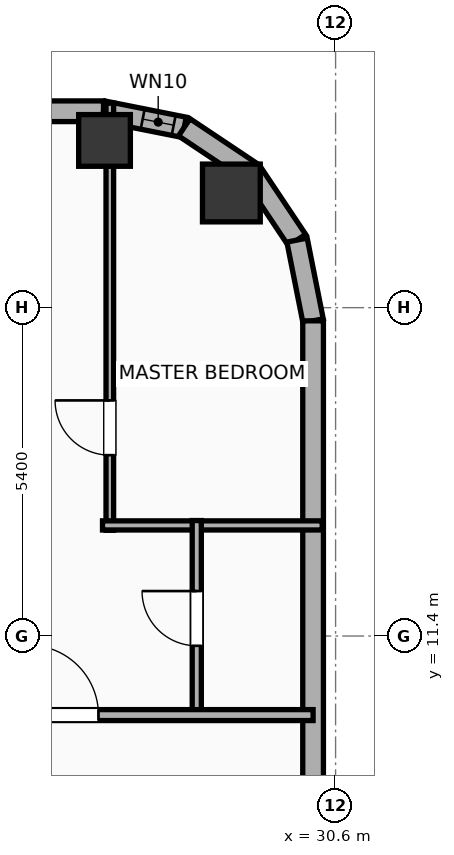
"""IFC4 building model, lengths in metres.
Left out: names, types, materials, properties, quantities, classifications, styles, units other than length and angle.
Written with IfcOpenShell. Run it as: python <this file> out.ifc"""

import sys

from ifc_helpers import new_model, si_unit, direction, frame, frame_2d, origin, origin_2d, place, context, subcontext, project, spatial, rectangle, hollow_rectangle, hollow_circle, extrude, element, fill, save


model = new_model("IFC4")
c1 = context("Model", 3, precision=1e-05, world=origin(), true_north=direction((0.0, 1.0)))
c2 = subcontext(c1, "Body", "Model", "MODEL_VIEW")
j1 = project(units=[si_unit("LENGTHUNIT", "METRE"), si_unit("PLANEANGLEUNIT", "RADIAN")], contexts=[c1])
p1 = place(None, origin())
s1 = spatial("IfcSite", under=j1, at=p1, CompositionType="ELEMENT")
p2 = place(p1, origin())
s2 = spatial("IfcBuilding", under=s1, at=p2, CompositionType="ELEMENT")
p3 = place(p2, frame((0.0, 0.0, 235.3)))
s3 = spatial("IfcBuildingStorey", under=s2, at=p3, CompositionType="ELEMENT", Elevation=235.3)
p4 = place(p3, frame((28.886, 18.686, 0.0), z_axis=(0.0, 0.0, 1.0), x_axis=(1.0, 0.0, 0.0)))
e1 = element("IfcColumn", 1, at=p4, inside=s3, PredefinedType="COLUMN", context=c2, shape_type="SweptSolid", body=[
    extrude(hollow_circle(Radius=0.475, WallThickness=0.032, at=origin_2d()), origin(), (0.0, 0.0, 1.0), 3.9),
])
p5 = place(p3, frame((26.8, 19.55, 0.0), z_axis=(0.0, 0.0, 1.0), x_axis=(1.0, 0.0, 0.0)))
e2 = element("IfcColumn", 2, at=p5, inside=s3, PredefinedType="COLUMN", context=c2, shape_type="SweptSolid", body=[
    extrude(hollow_rectangle(XDim=0.85, YDim=0.85, WallThickness=0.028, at=origin_2d()), origin(), (0.0, 0.0, 1.0), 3.9),
])
p6 = place(p3, frame((-22.783, 20.03, 0.0), z_axis=(0.0, 0.0, 1.0), x_axis=(1.0, 0.0, 0.0)))
e3 = element("IfcWall", 3, at=p6, inside=s3, PredefinedType="ELEMENTEDWALL", context=c2, shape_type="SweptSolid", body=[
    extrude(rectangle(XDim=49.566, YDim=0.34, at=frame_2d((24.783, 0.0))), origin(), (0.0, 0.0, 1.0), 3.65),
])
p7 = place(p6, frame((23.583, 0.0, 0.75)))
e4 = element("IfcOpeningElement", 4, at=p7, cuts=e3, PredefinedType="OPENING", context=c2, shape_type="SweptSolid", body=[
    extrude(rectangle(XDim=2.4, YDim=2.1, at=frame_2d((1.2, 1.05))), frame((0.0, 0.18, 0.0), z_axis=(0.0, -1.0, 0.0), x_axis=(1.0, 0.0, 0.0)), (0.0, 0.0, 1.0), 0.36),
])
p8 = place(p6, frame((40.956, 0.0, 0.75)))
e5 = element("IfcOpeningElement", 5, at=p8, cuts=e3, PredefinedType="OPENING", context=c2, shape_type="SweptSolid", body=[
    extrude(rectangle(XDim=2.4, YDim=2.1, at=frame_2d((1.2, 1.05))), frame((0.0, 0.18, 0.0), z_axis=(0.0, -1.0, 0.0), x_axis=(1.0, 0.0, 0.0)), (0.0, 0.0, 1.0), 0.36),
])
p9 = place(p6, frame((5.078, 0.0, 0.75)))
e6 = element("IfcOpeningElement", 6, at=p9, cuts=e3, PredefinedType="OPENING", context=c2, shape_type="SweptSolid", body=[
    extrude(rectangle(XDim=1.2, YDim=2.05, at=frame_2d((0.6, 1.025))), frame((0.0, 0.18, 0.0), z_axis=(0.0, -1.0, 0.0), x_axis=(1.0, 0.0, 0.0)), (0.0, 0.0, 1.0), 0.36),
])
p10 = place(p6, frame((8.058, 0.0, 0.75)))
e7 = element("IfcOpeningElement", 7, at=p10, cuts=e3, PredefinedType="OPENING", context=c2, shape_type="SweptSolid", body=[
    extrude(rectangle(XDim=1.2, YDim=2.05, at=frame_2d((0.6, 1.025))), frame((0.0, 0.18, 0.0), z_axis=(0.0, -1.0, 0.0), x_axis=(1.0, 0.0, 0.0)), (0.0, 0.0, 1.0), 0.36),
])
p11 = place(p6, frame((12.478, 0.0, 0.75)))
e8 = element("IfcOpeningElement", 8, at=p11, cuts=e3, PredefinedType="OPENING", context=c2, shape_type="SweptSolid", body=[
    extrude(rectangle(XDim=1.2, YDim=2.05, at=frame_2d((0.6, 1.025))), frame((0.0, 0.18, 0.0), z_axis=(0.0, -1.0, 0.0), x_axis=(1.0, 0.0, 0.0)), (0.0, 0.0, 1.0), 0.36),
])
p12 = place(p6, frame((16.178, 0.0, 0.75)))
e9 = element("IfcOpeningElement", 9, at=p12, cuts=e3, PredefinedType="OPENING", context=c2, shape_type="SweptSolid", body=[
    extrude(rectangle(XDim=1.2, YDim=2.05, at=frame_2d((0.6, 1.025))), frame((0.0, 0.18, 0.0), z_axis=(0.0, -1.0, 0.0), x_axis=(1.0, 0.0, 0.0)), (0.0, 0.0, 1.0), 0.36),
])
p13 = place(p6, frame((20.478, 0.0, 0.75)))
e10 = element("IfcOpeningElement", 10, at=p13, cuts=e3, PredefinedType="OPENING", context=c2, shape_type="SweptSolid", body=[
    extrude(rectangle(XDim=1.2, YDim=2.05, at=frame_2d((0.6, 1.025))), frame((0.0, 0.18, 0.0), z_axis=(0.0, -1.0, 0.0), x_axis=(1.0, 0.0, 0.0)), (0.0, 0.0, 1.0), 0.36),
])
p14 = place(p6, frame((27.278, 0.0, 0.75)))
e11 = element("IfcOpeningElement", 11, at=p14, cuts=e3, PredefinedType="OPENING", context=c2, shape_type="SweptSolid", body=[
    extrude(rectangle(XDim=1.2, YDim=2.05, at=frame_2d((0.6, 1.025))), frame((0.0, 0.18, 0.0), z_axis=(0.0, -1.0, 0.0), x_axis=(1.0, 0.0, 0.0)), (0.0, 0.0, 1.0), 0.36),
])
p15 = place(p6, frame((30.978, 0.0, 0.75)))
e12 = element("IfcOpeningElement", 12, at=p15, cuts=e3, PredefinedType="OPENING", context=c2, shape_type="SweptSolid", body=[
    extrude(rectangle(XDim=1.2, YDim=2.05, at=frame_2d((0.6, 1.025))), frame((0.0, 0.18, 0.0), z_axis=(0.0, -1.0, 0.0), x_axis=(1.0, 0.0, 0.0)), (0.0, 0.0, 1.0), 0.36),
])
p16 = place(p6, frame((34.678, 0.0, 0.75)))
e13 = element("IfcOpeningElement", 13, at=p16, cuts=e3, PredefinedType="OPENING", context=c2, shape_type="SweptSolid", body=[
    extrude(rectangle(XDim=1.2, YDim=2.05, at=frame_2d((0.6, 1.025))), frame((0.0, 0.18, 0.0), z_axis=(0.0, -1.0, 0.0), x_axis=(1.0, 0.0, 0.0)), (0.0, 0.0, 1.0), 0.36),
])
p17 = place(p6, frame((37.798, 0.0, 0.75)))
e14 = element("IfcOpeningElement", 14, at=p17, cuts=e3, PredefinedType="OPENING", context=c2, shape_type="SweptSolid", body=[
    extrude(rectangle(XDim=1.2, YDim=2.05, at=frame_2d((0.6, 1.025))), frame((0.0, 0.18, 0.0), z_axis=(0.0, -1.0, 0.0), x_axis=(1.0, 0.0, 0.0)), (0.0, 0.0, 1.0), 0.36),
])
p18 = place(p6, frame((45.83, 0.0, 0.75)))
e15 = element("IfcOpeningElement", 15, at=p18, cuts=e3, PredefinedType="OPENING", context=c2, shape_type="SweptSolid", body=[
    extrude(rectangle(XDim=1.2, YDim=2.05, at=frame_2d((0.6, 1.025))), frame((0.0, 0.18, 0.0), z_axis=(0.0, -1.0, 0.0), x_axis=(1.0, 0.0, 0.0)), (0.0, 0.0, 1.0), 0.36),
])
p19 = place(p3, frame((26.783, 20.03, 0.0), z_axis=(0.0, 0.0, 1.0), x_axis=(0.980788153188, -0.195075878998, 0.0)))
e16 = element("IfcWall", 16, at=p19, inside=s3, PredefinedType="ELEMENTEDWALL", context=c2, shape_type="SweptSolid", body=[
    extrude(rectangle(XDim=1.354, YDim=0.34, at=frame_2d((0.677, 0.0))), origin(), (0.0, 0.0, 1.0), 3.65),
])
p20 = place(p19, frame((0.657, 0.0, 0.75)))
e17 = element("IfcOpeningElement", 17, at=p20, cuts=e16, PredefinedType="OPENING", context=c2, shape_type="SweptSolid", body=[
    extrude(rectangle(XDim=0.52, YDim=2.05, at=frame_2d((0.26, 1.025))), frame((0.0, 0.18, 0.0), z_axis=(0.0, -1.0, 0.0), x_axis=(1.0, 0.0, 0.0)), (0.0, 0.0, 1.0), 0.36),
])
for number, where, z_axis, x_axis in (
    (18, (28.111, 19.766, 0.0), (0.0, 0.0, 1.0), (0.831, -0.556, 0.0)),
    (19, (29.223, 19.023, 0.0), (0.0, 0.0, 1.0), (0.556, -0.831, 0.0)),
):
    element("IfcWall", number, at=place(p3, frame(where, z_axis=z_axis, x_axis=x_axis)), inside=s3, PredefinedType="ELEMENTEDWALL", context=c2, shape_type="SweptSolid", body=[
        extrude(rectangle(XDim=1.337, YDim=0.34, at=frame_2d((0.668, 0.0))), origin(), (0.0, 0.0, 1.0), 3.65),
    ])
p21 = place(p3, frame((29.966, 17.911, 0.0), z_axis=(0.0, 0.0, 1.0), x_axis=(0.195075878998, -0.980788153188, 0.0)))
e20 = element("IfcWall", 20, at=p21, inside=s3, PredefinedType="ELEMENTEDWALL", context=c2, shape_type="SweptSolid", body=[
    extrude(rectangle(XDim=1.354, YDim=0.34, at=frame_2d((0.677, 0.0))), origin(), (0.0, 0.0, 1.0), 3.65),
])
p22 = place(p3, frame((30.23, 16.583, 0.0), z_axis=(0.0, 0.0, 1.0), x_axis=(0.0, -1.0, 0.0)))
e21 = element("IfcWall", 21, at=p22, inside=s3, PredefinedType="ELEMENTEDWALL", context=c2, shape_type="SweptSolid", body=[
    extrude(rectangle(XDim=31.967, YDim=0.34, at=frame_2d((15.983, 0.0))), origin(), (0.0, 0.0, 1.0), 3.65),
])
p23 = place(p22, frame((11.638, 0.0, 0.75)))
e22 = element("IfcOpeningElement", 22, at=p23, cuts=e21, PredefinedType="OPENING", context=c2, shape_type="SweptSolid", body=[
    extrude(rectangle(XDim=1.2, YDim=2.05, at=frame_2d((0.6, 1.025))), frame((0.0, 0.18, 0.0), z_axis=(0.0, -1.0, 0.0), x_axis=(1.0, 0.0, 0.0)), (0.0, 0.0, 1.0), 0.36),
])
p24 = place(p22, frame((20.188, 0.0, 0.75)))
e23 = element("IfcOpeningElement", 23, at=p24, cuts=e21, PredefinedType="OPENING", context=c2, shape_type="SweptSolid", body=[
    extrude(rectangle(XDim=1.2, YDim=2.05, at=frame_2d((0.6, 1.025))), frame((0.0, 0.18, 0.0), z_axis=(0.0, -1.0, 0.0), x_axis=(1.0, 0.0, 0.0)), (0.0, 0.0, 1.0), 0.36),
])
p25 = place(p3, frame((26.887, 13.139, 0.0), z_axis=(0.0, 0.0, 1.0), x_axis=(0.0, 1.0, 0.0)))
e24 = element("IfcWall", 24, at=p25, inside=s3, PredefinedType="PARTITIONING", context=c2, shape_type="SweptSolid", body=[
    extrude(rectangle(XDim=7.023, YDim=0.125, at=frame_2d((3.512, 0.0))), origin(), (0.0, 0.0, 1.0), 3.65),
])
p26 = place(p25, frame((1.236, 0.0, 0.0)))
e25 = element("IfcOpeningElement", 25, at=p26, cuts=e24, PredefinedType="OPENING", context=c2, shape_type="SweptSolid", body=[
    extrude(rectangle(XDim=0.9, YDim=2.05, at=frame_2d((0.45, 1.025))), frame((0.0, 0.073, 0.0), z_axis=(0.0, -1.0, 0.0), x_axis=(1.0, 0.0, 0.0)), (0.0, 0.0, 1.0), 0.145),
])
p27 = place(p3, frame((26.767, 13.219, 0.0), z_axis=(0.0, 0.0, 1.0), x_axis=(1.0, 0.0, 0.0)))
e26 = element("IfcWall", 26, at=p27, inside=s3, PredefinedType="PLUMBINGWALL", context=c2, shape_type="SweptSolid", body=[
    extrude(rectangle(XDim=3.613, YDim=0.15, at=frame_2d((1.806, 0.0))), origin(), (0.0, 0.0, 1.0), 3.65),
])
p28 = place(p3, frame((28.317, 10.08, 0.0), z_axis=(0.0, 0.0, 1.0), x_axis=(0.0, 1.0, 0.0)))
e27 = element("IfcWall", 27, at=p28, inside=s3, PredefinedType="PLUMBINGWALL", context=c2, shape_type="SweptSolid", body=[
    extrude(rectangle(XDim=3.219, YDim=0.15, at=frame_2d((1.609, 0.0))), origin(), (0.0, 0.0, 1.0), 3.65),
])
p29 = place(p28, frame((1.159, 0.0, 0.0)))
e28 = element("IfcOpeningElement", 28, at=p29, cuts=e27, PredefinedType="OPENING", context=c2, shape_type="SweptSolid", body=[
    extrude(rectangle(XDim=0.9, YDim=2.05, at=frame_2d((0.45, 1.025))), frame((0.0, 0.085, 0.0), z_axis=(0.0, -1.0, 0.0), x_axis=(1.0, 0.0, 0.0)), (0.0, 0.0, 1.0), 0.17),
])
p30 = place(p3, frame((-26.23, 10.1, 0.0), z_axis=(0.0, 0.0, 1.0), x_axis=(1.0, 0.0, 0.0)))
e29 = element("IfcWall", 29, at=p30, inside=s3, PredefinedType="PARTITIONING", context=c2, shape_type="SweptSolid", body=[
    extrude(rectangle(XDim=56.46, YDim=0.18, at=frame_2d((28.23, 0.0))), origin(), (0.0, 0.0, 1.0), 3.65),
])
p31 = place(p30, frame((5.302, 0.0, 0.0)))
e30 = element("IfcOpeningElement", 30, at=p31, cuts=e29, PredefinedType="OPENING", context=c2, shape_type="SweptSolid", body=[
    extrude(rectangle(XDim=1.15, YDim=2.05, at=frame_2d((0.575, 1.025))), frame((0.0, 0.1, 0.0), z_axis=(0.0, -1.0, 0.0), x_axis=(1.0, 0.0, 0.0)), (0.0, 0.0, 1.0), 0.2),
])
p32 = place(p30, frame((14.122, 0.0, 0.0)))
e31 = element("IfcOpeningElement", 31, at=p32, cuts=e29, PredefinedType="OPENING", context=c2, shape_type="SweptSolid", body=[
    extrude(rectangle(XDim=1.15, YDim=2.05, at=frame_2d((0.575, 1.025))), frame((0.0, 0.1, 0.0), z_axis=(0.0, -1.0, 0.0), x_axis=(1.0, 0.0, 0.0)), (0.0, 0.0, 1.0), 0.2),
])
p33 = place(p30, frame((21.518, 0.0, 0.0)))
e32 = element("IfcOpeningElement", 32, at=p33, cuts=e29, PredefinedType="OPENING", context=c2, shape_type="SweptSolid", body=[
    extrude(rectangle(XDim=1.15, YDim=2.05, at=frame_2d((0.575, 1.025))), frame((0.0, 0.1, 0.0), z_axis=(0.0, -1.0, 0.0), x_axis=(1.0, 0.0, 0.0)), (0.0, 0.0, 1.0), 0.2),
])
p34 = place(p30, frame((28.92, 0.0, 0.0)))
e33 = element("IfcOpeningElement", 33, at=p34, cuts=e29, PredefinedType="OPENING", context=c2, shape_type="SweptSolid", body=[
    extrude(rectangle(XDim=1.15, YDim=2.05, at=frame_2d((0.575, 1.025))), frame((0.0, 0.1, 0.0), z_axis=(0.0, -1.0, 0.0), x_axis=(1.0, 0.0, 0.0)), (0.0, 0.0, 1.0), 0.2),
])
p35 = place(p30, frame((36.322, 0.0, 0.0)))
e34 = element("IfcOpeningElement", 34, at=p35, cuts=e29, PredefinedType="OPENING", context=c2, shape_type="SweptSolid", body=[
    extrude(rectangle(XDim=1.15, YDim=2.05, at=frame_2d((0.575, 1.025))), frame((0.0, 0.1, 0.0), z_axis=(0.0, -1.0, 0.0), x_axis=(1.0, 0.0, 0.0)), (0.0, 0.0, 1.0), 0.2),
])
p36 = place(p30, frame((43.622, 0.0, 0.0)))
e35 = element("IfcOpeningElement", 35, at=p36, cuts=e29, PredefinedType="OPENING", context=c2, shape_type="SweptSolid", body=[
    extrude(rectangle(XDim=1.15, YDim=2.05, at=frame_2d((0.575, 1.025))), frame((0.0, 0.1, 0.0), z_axis=(0.0, -1.0, 0.0), x_axis=(1.0, 0.0, 0.0)), (0.0, 0.0, 1.0), 0.2),
])
p37 = place(p30, frame((51.781, 0.0, 0.0)))
e36 = element("IfcOpeningElement", 36, at=p37, cuts=e29, PredefinedType="OPENING", context=c2, shape_type="SweptSolid", body=[
    extrude(rectangle(XDim=1.15, YDim=2.05, at=frame_2d((0.575, 1.025))), frame((0.0, 0.1, 0.0), z_axis=(0.0, -1.0, 0.0), x_axis=(1.0, 0.0, 0.0)), (0.0, 0.0, 1.0), 0.2),
])
p38 = place(p20, origin())
e37 = element("IfcWindow", 37, at=p38, inside=s3, PartitioningType="SINGLE_PANEL", PredefinedType="WINDOW", context=c2, shape_type="SweptSolid", body=[
    extrude(rectangle(XDim=0.52, YDim=2.05, at=frame_2d((0.26, 1.025))), frame((0.0, 0.03, 0.0), z_axis=(0.0, -1.0, 0.0), x_axis=(1.0, 0.0, 0.0)), (0.0, 0.0, 1.0), 0.06),
])
fill(e17, e37)
p39 = place(p26, origin())
e38 = element("IfcDoor", 38, at=p39, inside=s3, OperationType="SINGLE_SWING_RIGHT", PredefinedType="DOOR", context=c2, shape_type="SweptSolid", body=[
    extrude(rectangle(XDim=0.9, YDim=2.05, at=frame_2d((0.45, 1.025))), frame((0.0, 0.025, 0.0), z_axis=(0.0, -1.0, 0.0), x_axis=(1.0, 0.0, 0.0)), (0.0, 0.0, 1.0), 0.05),
])
fill(e25, e38)
p40 = place(p29, origin())
e39 = element("IfcDoor", 39, at=p40, inside=s3, OperationType="SINGLE_SWING_RIGHT", PredefinedType="DOOR", context=c2, shape_type="SweptSolid", body=[
    extrude(rectangle(XDim=0.9, YDim=2.05, at=frame_2d((0.45, 1.025))), frame((0.0, 0.025, 0.0), z_axis=(0.0, -1.0, 0.0), x_axis=(1.0, 0.0, 0.0)), (0.0, 0.0, 1.0), 0.05),
])
fill(e28, e39)
p41 = place(p37, origin())
e40 = element("IfcDoor", 40, at=p41, inside=s3, OperationType="SINGLE_SWING_LEFT", PredefinedType="DOOR", context=c2, shape_type="SweptSolid", body=[
    extrude(rectangle(XDim=1.15, YDim=2.05, at=frame_2d((0.575, 1.025))), frame((0.0, 0.025, 0.0), z_axis=(0.0, -1.0, 0.0), x_axis=(1.0, 0.0, 0.0)), (0.0, 0.0, 1.0), 0.05),
])
fill(e36, e40)
save(model, sys.argv[1])
